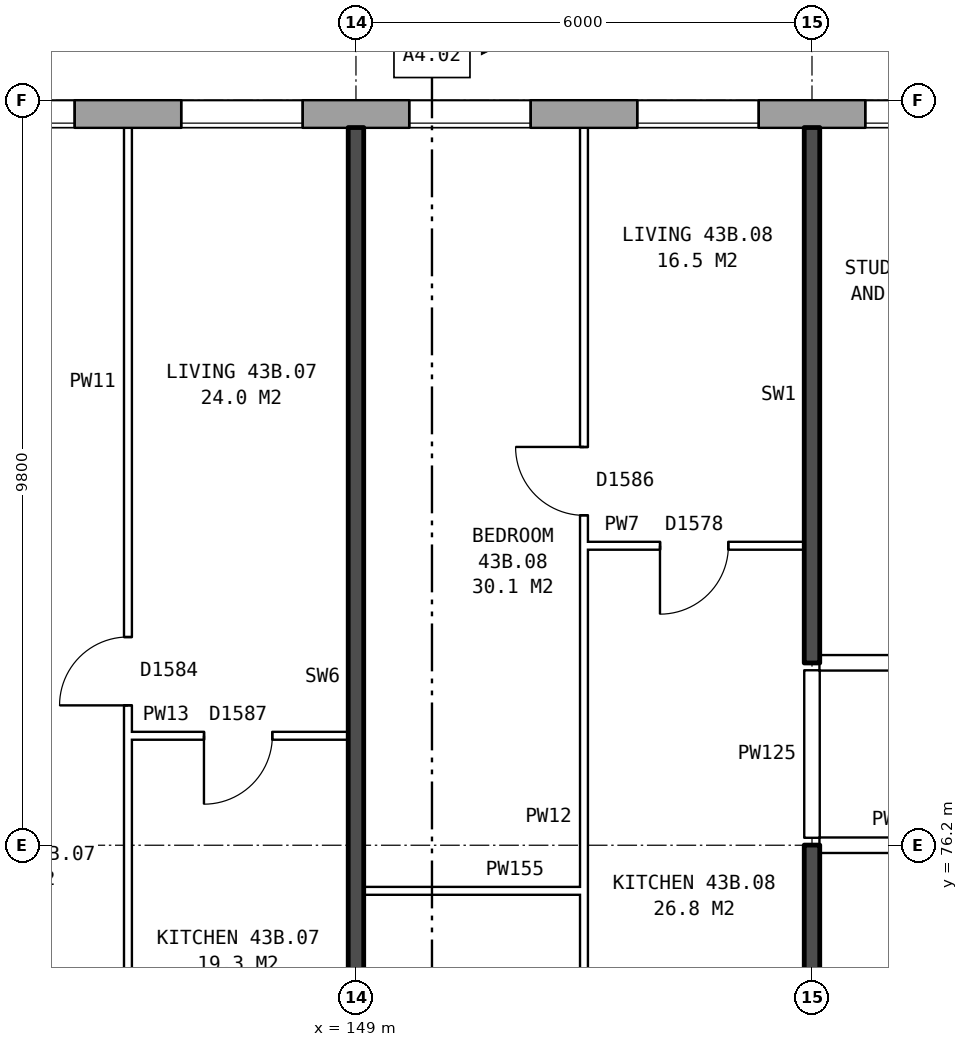
"""IFC4 building model, lengths in metres.
Left out: names, types, materials, properties, quantities, classifications, styles, units other than length and angle.
Written with IfcOpenShell. Run it as: python <this file> out.ifc"""

import sys

from ifc_helpers import new_model, si_unit, direction, frame, frame_2d, origin, place, context, subcontext, project, spatial, rectangle, extrude, element, fill, save


model = new_model("IFC4")
c1 = context("Model", 3, precision=1e-05, world=origin(), true_north=direction((0.0, 1.0)))
c2 = subcontext(c1, "Body", "Model", "MODEL_VIEW")
j1 = project(units=[si_unit("LENGTHUNIT", "METRE"), si_unit("PLANEANGLEUNIT", "RADIAN")], contexts=[c1])
p1 = place(None, origin())
s1 = spatial("IfcSite", under=j1, at=p1, CompositionType="ELEMENT")
p2 = place(p1, origin())
s2 = spatial("IfcBuilding", under=s1, at=p2, CompositionType="ELEMENT")
p3 = place(p2, frame((0.0, 0.0, 154.7)))
s3 = spatial("IfcBuildingStorey", under=s2, at=p3, CompositionType="ELEMENT", Elevation=154.7)
p4 = place(p3, frame((168.425, 85.82, 0.0), z_axis=(0.0, 0.0, 1.0), x_axis=(-1.0, 0.0, 0.0)))
e1 = element("IfcWall", 1, at=p4, inside=s3, PredefinedType="STANDARD", context=c2, shape_type="SweptSolid", body=[
    extrude(rectangle(XDim=34.351, YDim=0.36, at=frame_2d((17.175, 0.0))), origin(), (0.0, 0.0, 1.0), 2.85),
])
p5 = place(p4, frame((2.125, 0.0, 0.8)))
e2 = element("IfcOpeningElement", 2, at=p5, cuts=e1, PredefinedType="OPENING", context=c2, shape_type="SweptSolid", body=[
    extrude(rectangle(XDim=1.6, YDim=1.8, at=frame_2d((0.8, 0.9))), frame((0.0, 0.19, 0.0), z_axis=(0.0, -1.0, 0.0), x_axis=(1.0, 0.0, 0.0)), (0.0, 0.0, 1.0), 0.38),
])
p6 = place(p4, frame((4.025, 0.0, 1.7)))
e3 = element("IfcOpeningElement", 3, at=p6, cuts=e1, PredefinedType="OPENING", context=c2, shape_type="SweptSolid", body=[
    extrude(rectangle(XDim=1.4, YDim=0.9, at=frame_2d((0.7, 0.45))), frame((0.0, 0.19, 0.0), z_axis=(0.0, -1.0, 0.0), x_axis=(1.0, 0.0, 0.0)), (0.0, 0.0, 1.0), 0.38),
])
p7 = place(p4, frame((8.125, 0.0, 0.8)))
e4 = element("IfcOpeningElement", 4, at=p7, cuts=e1, PredefinedType="OPENING", context=c2, shape_type="SweptSolid", body=[
    extrude(rectangle(XDim=1.6, YDim=1.8, at=frame_2d((0.8, 0.9))), frame((0.0, 0.19, 0.0), z_axis=(0.0, -1.0, 0.0), x_axis=(1.0, 0.0, 0.0)), (0.0, 0.0, 1.0), 0.38),
])
p8 = place(p4, frame((11.125, 0.0, 0.8)))
e5 = element("IfcOpeningElement", 5, at=p8, cuts=e1, PredefinedType="OPENING", context=c2, shape_type="SweptSolid", body=[
    extrude(rectangle(XDim=1.6, YDim=1.8, at=frame_2d((0.8, 0.9))), frame((0.0, 0.19, 0.0), z_axis=(0.0, -1.0, 0.0), x_axis=(1.0, 0.0, 0.0)), (0.0, 0.0, 1.0), 0.38),
])
p9 = place(p4, frame((14.125, 0.0, 0.8)))
e6 = element("IfcOpeningElement", 6, at=p9, cuts=e1, PredefinedType="OPENING", context=c2, shape_type="SweptSolid", body=[
    extrude(rectangle(XDim=1.6, YDim=1.8, at=frame_2d((0.8, 0.9))), frame((0.0, 0.19, 0.0), z_axis=(0.0, -1.0, 0.0), x_axis=(1.0, 0.0, 0.0)), (0.0, 0.0, 1.0), 0.38),
])
p10 = place(p4, frame((17.125, 0.0, 0.8)))
e7 = element("IfcOpeningElement", 7, at=p10, cuts=e1, PredefinedType="OPENING", context=c2, shape_type="SweptSolid", body=[
    extrude(rectangle(XDim=1.6, YDim=1.8, at=frame_2d((0.8, 0.9))), frame((0.0, 0.19, 0.0), z_axis=(0.0, -1.0, 0.0), x_axis=(1.0, 0.0, 0.0)), (0.0, 0.0, 1.0), 0.38),
])
p11 = place(p4, frame((20.125, 0.0, 0.8)))
e8 = element("IfcOpeningElement", 8, at=p11, cuts=e1, PredefinedType="OPENING", context=c2, shape_type="SweptSolid", body=[
    extrude(rectangle(XDim=1.6, YDim=1.8, at=frame_2d((0.8, 0.9))), frame((0.0, 0.19, 0.0), z_axis=(0.0, -1.0, 0.0), x_axis=(1.0, 0.0, 0.0)), (0.0, 0.0, 1.0), 0.38),
])
p12 = place(p4, frame((23.125, 0.0, 0.8)))
e9 = element("IfcOpeningElement", 9, at=p12, cuts=e1, PredefinedType="OPENING", context=c2, shape_type="SweptSolid", body=[
    extrude(rectangle(XDim=1.6, YDim=1.8, at=frame_2d((0.8, 0.9))), frame((0.0, 0.19, 0.0), z_axis=(0.0, -1.0, 0.0), x_axis=(1.0, 0.0, 0.0)), (0.0, 0.0, 1.0), 0.38),
])
p13 = place(p4, frame((25.625, 0.0, 0.8)))
e10 = element("IfcOpeningElement", 10, at=p13, cuts=e1, PredefinedType="OPENING", context=c2, shape_type="SweptSolid", body=[
    extrude(rectangle(XDim=1.0, YDim=1.8, at=frame_2d((0.5, 0.9))), frame((0.0, 0.19, 0.0), z_axis=(0.0, -1.0, 0.0), x_axis=(1.0, 0.0, 0.0)), (0.0, 0.0, 1.0), 0.38),
])
p14 = place(p4, frame((26.925, 0.0, 0.8)))
e11 = element("IfcOpeningElement", 11, at=p14, cuts=e1, PredefinedType="OPENING", context=c2, shape_type="SweptSolid", body=[
    extrude(rectangle(XDim=0.8, YDim=0.9, at=frame_2d((0.4, 0.45))), frame((0.0, 0.19, 0.0), z_axis=(0.0, -1.0, 0.0), x_axis=(1.0, 0.0, 0.0)), (0.0, 0.0, 1.0), 0.38),
])
p15 = place(p4, frame((32.125, 0.0, 0.8)))
e12 = element("IfcOpeningElement", 12, at=p15, cuts=e1, PredefinedType="OPENING", context=c2, shape_type="SweptSolid", body=[
    extrude(rectangle(XDim=1.6, YDim=1.8, at=frame_2d((0.8, 0.9))), frame((0.0, 0.19, 0.0), z_axis=(0.0, -1.0, 0.0), x_axis=(1.0, 0.0, 0.0)), (0.0, 0.0, 1.0), 0.38),
])
p16 = place(p4, frame((6.625, 0.0, 0.8)))
e13 = element("IfcOpeningElement", 13, at=p16, cuts=e1, PredefinedType="OPENING", context=c2, shape_type="SweptSolid", body=[
    extrude(rectangle(XDim=0.6, YDim=0.9, at=frame_2d((0.3, 0.45))), frame((0.0, 0.19, 0.0), z_axis=(0.0, -1.0, 0.0), x_axis=(1.0, 0.0, 0.0)), (0.0, 0.0, 1.0), 0.38),
])
p17 = place(p4, frame((28.925, 0.0, 1.7)))
e14 = element("IfcOpeningElement", 14, at=p17, cuts=e1, PredefinedType="OPENING", context=c2, shape_type="SweptSolid", body=[
    extrude(rectangle(XDim=0.8, YDim=0.9, at=frame_2d((0.4, 0.45))), frame((0.0, 0.19, 0.0), z_axis=(0.0, -1.0, 0.0), x_axis=(1.0, 0.0, 0.0)), (0.0, 0.0, 1.0), 0.38),
])
p18 = place(p4, frame((30.025, 0.0, 0.8)))
e15 = element("IfcOpeningElement", 15, at=p18, cuts=e1, PredefinedType="OPENING", context=c2, shape_type="SweptSolid", body=[
    extrude(rectangle(XDim=1.2, YDim=1.8, at=frame_2d((0.6, 0.9))), frame((0.0, 0.19, 0.0), z_axis=(0.0, -1.0, 0.0), x_axis=(1.0, 0.0, 0.0)), (0.0, 0.0, 1.0), 0.38),
])
p19 = place(p3, frame((149.1, 75.6, 0.0), z_axis=(0.0, 0.0, 1.0), x_axis=(1.0, 0.0, 0.0)))
e16 = element("IfcWall", 16, at=p19, inside=s3, PredefinedType="PARTITIONING", context=c2, shape_type="SweptSolid", body=[
    extrude(rectangle(XDim=2.9, YDim=0.1, at=frame_2d((1.45, 0.0))), origin(), (0.0, 0.0, 1.0), 2.85),
])
p20 = place(p3, frame((155.1, 76.2, 0.0), z_axis=(0.0, 0.0, 1.0), x_axis=(1.0, 0.0, 0.0)))
e17 = element("IfcWall", 17, at=p20, inside=s3, PredefinedType="PARTITIONING", context=c2, shape_type="SweptSolid", body=[
    extrude(rectangle(XDim=2.14, YDim=0.2, at=frame_2d((1.07, 0.0))), origin(), (0.0, 0.0, 1.0), 2.85),
])
p21 = place(p3, frame((146.0, 77.64, 0.0), z_axis=(0.0, 0.0, 1.0), x_axis=(1.0, 0.0, 0.0)))
e18 = element("IfcWall", 18, at=p21, inside=s3, PredefinedType="PARTITIONING", context=c2, shape_type="SweptSolid", body=[
    extrude(rectangle(XDim=2.9, YDim=0.1, at=frame_2d((1.45, 0.0))), origin(), (0.0, 0.0, 1.0), 2.85),
])
p22 = place(p21, frame((1.0, 0.0, 0.0)))
e19 = element("IfcOpeningElement", 19, at=p22, cuts=e18, PredefinedType="OPENING", context=c2, shape_type="SweptSolid", body=[
    extrude(rectangle(XDim=0.9, YDim=2.1, at=frame_2d((0.45, 1.05))), frame((0.0, 0.06, 0.0), z_axis=(0.0, -1.0, 0.0), x_axis=(1.0, 0.0, 0.0)), (0.0, 0.0, 1.0), 0.12),
])
p23 = place(p3, frame((155.1, 78.6, 0.0), z_axis=(0.0, 0.0, 1.0), x_axis=(1.0, 0.0, 0.0)))
e20 = element("IfcWall", 20, at=p23, inside=s3, PredefinedType="PARTITIONING", context=c2, shape_type="SweptSolid", body=[
    extrude(rectangle(XDim=16.04, YDim=0.2, at=frame_2d((8.02, 0.0))), origin(), (0.0, 0.0, 1.0), 2.85),
])
p24 = place(p23, frame((1.45, 0.0, 0.0)))
e21 = element("IfcOpeningElement", 21, at=p24, cuts=e20, PredefinedType="OPENING", context=c2, shape_type="SweptSolid", body=[
    extrude(rectangle(XDim=1.0, YDim=2.1, at=frame_2d((0.5, 1.05))), frame((0.0, 0.11, 0.0), z_axis=(0.0, -1.0, 0.0), x_axis=(1.0, 0.0, 0.0)), (0.0, 0.0, 1.0), 0.22),
])
p25 = place(p23, frame((8.4, 0.0, 0.0)))
e22 = element("IfcOpeningElement", 22, at=p25, cuts=e20, PredefinedType="OPENING", context=c2, shape_type="SweptSolid", body=[
    extrude(rectangle(XDim=1.0, YDim=2.1, at=frame_2d((0.5, 1.05))), frame((0.0, 0.11, 0.0), z_axis=(0.0, -1.0, 0.0), x_axis=(1.0, 0.0, 0.0)), (0.0, 0.0, 1.0), 0.22),
])
p26 = place(p3, frame((152.0, 80.14, 0.0), z_axis=(0.0, 0.0, 1.0), x_axis=(1.0, 0.0, 0.0)))
e23 = element("IfcWall", 23, at=p26, inside=s3, PredefinedType="PARTITIONING", context=c2, shape_type="SweptSolid", body=[
    extrude(rectangle(XDim=2.9, YDim=0.1, at=frame_2d((1.45, 0.0))), origin(), (0.0, 0.0, 1.0), 2.85),
])
p27 = place(p26, frame((1.0, 0.0, 0.0)))
e24 = element("IfcOpeningElement", 24, at=p27, cuts=e23, PredefinedType="OPENING", context=c2, shape_type="SweptSolid", body=[
    extrude(rectangle(XDim=0.9, YDim=2.1, at=frame_2d((0.45, 1.05))), frame((0.0, 0.06, 0.0), z_axis=(0.0, -1.0, 0.0), x_axis=(1.0, 0.0, 0.0)), (0.0, 0.0, 1.0), 0.12),
])
p28 = place(p3, frame((146.0, 71.3, 0.0), z_axis=(0.0, 0.0, 1.0), x_axis=(0.0, 1.0, 0.0)))
e25 = element("IfcWall", 25, at=p28, inside=s3, PredefinedType="PARTITIONING", context=c2, shape_type="SweptSolid", body=[
    extrude(rectangle(XDim=14.34, YDim=0.1, at=frame_2d((7.17, 0.0))), origin(), (0.0, 0.0, 1.0), 2.85),
])
p29 = place(p28, frame((6.74, 0.0, 0.0)))
e26 = element("IfcOpeningElement", 26, at=p29, cuts=e25, PredefinedType="OPENING", context=c2, shape_type="SweptSolid", body=[
    extrude(rectangle(XDim=0.9, YDim=2.1, at=frame_2d((0.45, 1.05))), frame((0.0, 0.06, 0.0), z_axis=(0.0, -1.0, 0.0), x_axis=(1.0, 0.0, 0.0)), (0.0, 0.0, 1.0), 0.12),
])
p30 = place(p28, frame((0.4, 0.0, 0.0)))
e27 = element("IfcOpeningElement", 27, at=p30, cuts=e25, PredefinedType="OPENING", context=c2, shape_type="SweptSolid", body=[
    extrude(rectangle(XDim=0.9, YDim=2.1, at=frame_2d((0.45, 1.05))), frame((0.0, 0.06, 0.0), z_axis=(0.0, -1.0, 0.0), x_axis=(1.0, 0.0, 0.0)), (0.0, 0.0, 1.0), 0.12),
])
p31 = place(p3, frame((149.0, 71.2, 0.0), z_axis=(0.0, 0.0, 1.0), x_axis=(0.0, 1.0, 0.0)))
e28 = element("IfcWall", 28, at=p31, inside=s3, PredefinedType="SOLIDWALL", context=c2, shape_type="SweptSolid", body=[
    extrude(rectangle(XDim=14.44, YDim=0.2, at=frame_2d((7.22, 0.0))), origin(), (0.0, 0.0, 1.0), 2.85),
])
p32 = place(p3, frame((152.0, 71.3, 0.0), z_axis=(0.0, 0.0, 1.0), x_axis=(0.0, 1.0, 0.0)))
e29 = element("IfcWall", 29, at=p32, inside=s3, PredefinedType="PARTITIONING", context=c2, shape_type="SweptSolid", body=[
    extrude(rectangle(XDim=14.34, YDim=0.1, at=frame_2d((7.17, 0.0))), origin(), (0.0, 0.0, 1.0), 2.85),
])
p33 = place(p32, frame((9.24, 0.0, 0.0)))
e30 = element("IfcOpeningElement", 30, at=p33, cuts=e29, PredefinedType="OPENING", context=c2, shape_type="SweptSolid", body=[
    extrude(rectangle(XDim=0.9, YDim=2.1, at=frame_2d((0.45, 1.05))), frame((0.0, 0.06, 0.0), z_axis=(0.0, -1.0, 0.0), x_axis=(1.0, 0.0, 0.0)), (0.0, 0.0, 1.0), 0.12),
])
p34 = place(p32, frame((0.4, 0.0, 0.0)))
e31 = element("IfcOpeningElement", 31, at=p34, cuts=e29, PredefinedType="OPENING", context=c2, shape_type="SweptSolid", body=[
    extrude(rectangle(XDim=0.9, YDim=2.1, at=frame_2d((0.45, 1.05))), frame((0.0, 0.06, 0.0), z_axis=(0.0, -1.0, 0.0), x_axis=(1.0, 0.0, 0.0)), (0.0, 0.0, 1.0), 0.12),
])
p35 = place(p3, frame((155.0, 71.2, 0.0), z_axis=(0.0, 0.0, 1.0), x_axis=(0.0, 1.0, 0.0)))
e32 = element("IfcWall", 32, at=p35, inside=s3, PredefinedType="SOLIDWALL", context=c2, shape_type="SweptSolid", body=[
    extrude(rectangle(XDim=5.0, YDim=0.2, at=frame_2d((2.5, 0.0))), origin(), (0.0, 0.0, 1.0), 2.85),
])
p36 = place(p3, frame((155.0, 76.3, 0.0), z_axis=(0.0, 0.0, 1.0), x_axis=(0.0, 1.0, 0.0)))
e33 = element("IfcWall", 33, at=p36, inside=s3, PredefinedType="PARTITIONING", context=c2, shape_type="SweptSolid", body=[
    extrude(rectangle(XDim=2.2, YDim=0.2, at=frame_2d((1.1, 0.0))), origin(), (0.0, 0.0, 1.0), 2.85),
])
p37 = place(p3, frame((155.0, 78.6, 0.0), z_axis=(0.0, 0.0, 1.0), x_axis=(0.0, 1.0, 0.0)))
e34 = element("IfcWall", 34, at=p37, inside=s3, PredefinedType="SOLIDWALL", context=c2, shape_type="SweptSolid", body=[
    extrude(rectangle(XDim=7.04, YDim=0.2, at=frame_2d((3.52, 0.0))), origin(), (0.0, 0.0, 1.0), 2.85),
])
p38 = place(p8, origin())
e35 = element("IfcWindow", 35, at=p38, inside=s3, PartitioningType="SINGLE_PANEL", PredefinedType="WINDOW", context=c2, shape_type="SweptSolid", body=[
    extrude(rectangle(XDim=1.6, YDim=1.8, at=frame_2d((0.8, 0.9))), frame((0.0, 0.15, 0.0), z_axis=(0.0, -1.0, 0.0), x_axis=(1.0, 0.0, 0.0)), (0.0, 0.0, 1.0), 0.06),
])
fill(e5, e35)
p39 = place(p9, origin())
e36 = element("IfcWindow", 36, at=p39, inside=s3, PartitioningType="SINGLE_PANEL", PredefinedType="WINDOW", context=c2, shape_type="SweptSolid", body=[
    extrude(rectangle(XDim=1.6, YDim=1.8, at=frame_2d((0.8, 0.9))), frame((0.0, 0.15, 0.0), z_axis=(0.0, -1.0, 0.0), x_axis=(1.0, 0.0, 0.0)), (0.0, 0.0, 1.0), 0.06),
])
fill(e6, e36)
p40 = place(p10, origin())
e37 = element("IfcWindow", 37, at=p40, inside=s3, PartitioningType="SINGLE_PANEL", PredefinedType="WINDOW", context=c2, shape_type="SweptSolid", body=[
    extrude(rectangle(XDim=1.6, YDim=1.8, at=frame_2d((0.8, 0.9))), frame((0.0, 0.15, 0.0), z_axis=(0.0, -1.0, 0.0), x_axis=(1.0, 0.0, 0.0)), (0.0, 0.0, 1.0), 0.06),
])
fill(e7, e37)
p41 = place(p11, origin())
e38 = element("IfcWindow", 38, at=p41, inside=s3, PartitioningType="SINGLE_PANEL", PredefinedType="WINDOW", context=c2, shape_type="SweptSolid", body=[
    extrude(rectangle(XDim=1.6, YDim=1.8, at=frame_2d((0.8, 0.9))), frame((0.0, 0.15, 0.0), z_axis=(0.0, -1.0, 0.0), x_axis=(1.0, 0.0, 0.0)), (0.0, 0.0, 1.0), 0.06),
])
fill(e8, e38)
p42 = place(p12, origin())
e39 = element("IfcWindow", 39, at=p42, inside=s3, PartitioningType="SINGLE_PANEL", PredefinedType="WINDOW", context=c2, shape_type="SweptSolid", body=[
    extrude(rectangle(XDim=1.6, YDim=1.8, at=frame_2d((0.8, 0.9))), frame((0.0, 0.15, 0.0), z_axis=(0.0, -1.0, 0.0), x_axis=(1.0, 0.0, 0.0)), (0.0, 0.0, 1.0), 0.06),
])
fill(e9, e39)
p43 = place(p29, origin())
e40 = element("IfcDoor", 40, at=p43, inside=s3, OperationType="SINGLE_SWING_LEFT", PredefinedType="DOOR", context=c2, shape_type="SweptSolid", body=[
    extrude(rectangle(XDim=0.9, YDim=2.1, at=frame_2d((0.45, 1.05))), frame((0.0, 0.025, 0.0), z_axis=(0.0, -1.0, 0.0), x_axis=(1.0, 0.0, 0.0)), (0.0, 0.0, 1.0), 0.05),
])
fill(e26, e40)
p44 = place(p22, frame((0.9, 0.0, 0.0), z_axis=(0.0, 0.0, 1.0), x_axis=(-1.0, 0.0, 0.0)))
e41 = element("IfcDoor", 41, at=p44, inside=s3, OperationType="SINGLE_SWING_RIGHT", PredefinedType="DOOR", context=c2, shape_type="SweptSolid", body=[
    extrude(rectangle(XDim=0.9, YDim=2.1, at=frame_2d((0.45, 1.05))), frame((0.0, 0.025, 0.0), z_axis=(0.0, -1.0, 0.0), x_axis=(1.0, 0.0, 0.0)), (0.0, 0.0, 1.0), 0.05),
])
fill(e19, e41)
p45 = place(p33, origin())
e42 = element("IfcDoor", 42, at=p45, inside=s3, OperationType="SINGLE_SWING_RIGHT", PredefinedType="DOOR", context=c2, shape_type="SweptSolid", body=[
    extrude(rectangle(XDim=0.9, YDim=2.1, at=frame_2d((0.45, 1.05))), frame((0.0, 0.025, 0.0), z_axis=(0.0, -1.0, 0.0), x_axis=(1.0, 0.0, 0.0)), (0.0, 0.0, 1.0), 0.05),
])
fill(e30, e42)
p46 = place(p27, frame((0.9, 0.0, 0.0), z_axis=(0.0, 0.0, 1.0), x_axis=(-1.0, 0.0, 0.0)))
e43 = element("IfcDoor", 43, at=p46, inside=s3, OperationType="SINGLE_SWING_RIGHT", PredefinedType="DOOR", context=c2, shape_type="SweptSolid", body=[
    extrude(rectangle(XDim=0.9, YDim=2.1, at=frame_2d((0.45, 1.05))), frame((0.0, 0.025, 0.0), z_axis=(0.0, -1.0, 0.0), x_axis=(1.0, 0.0, 0.0)), (0.0, 0.0, 1.0), 0.05),
])
fill(e24, e43)
save(model, sys.argv[1])
